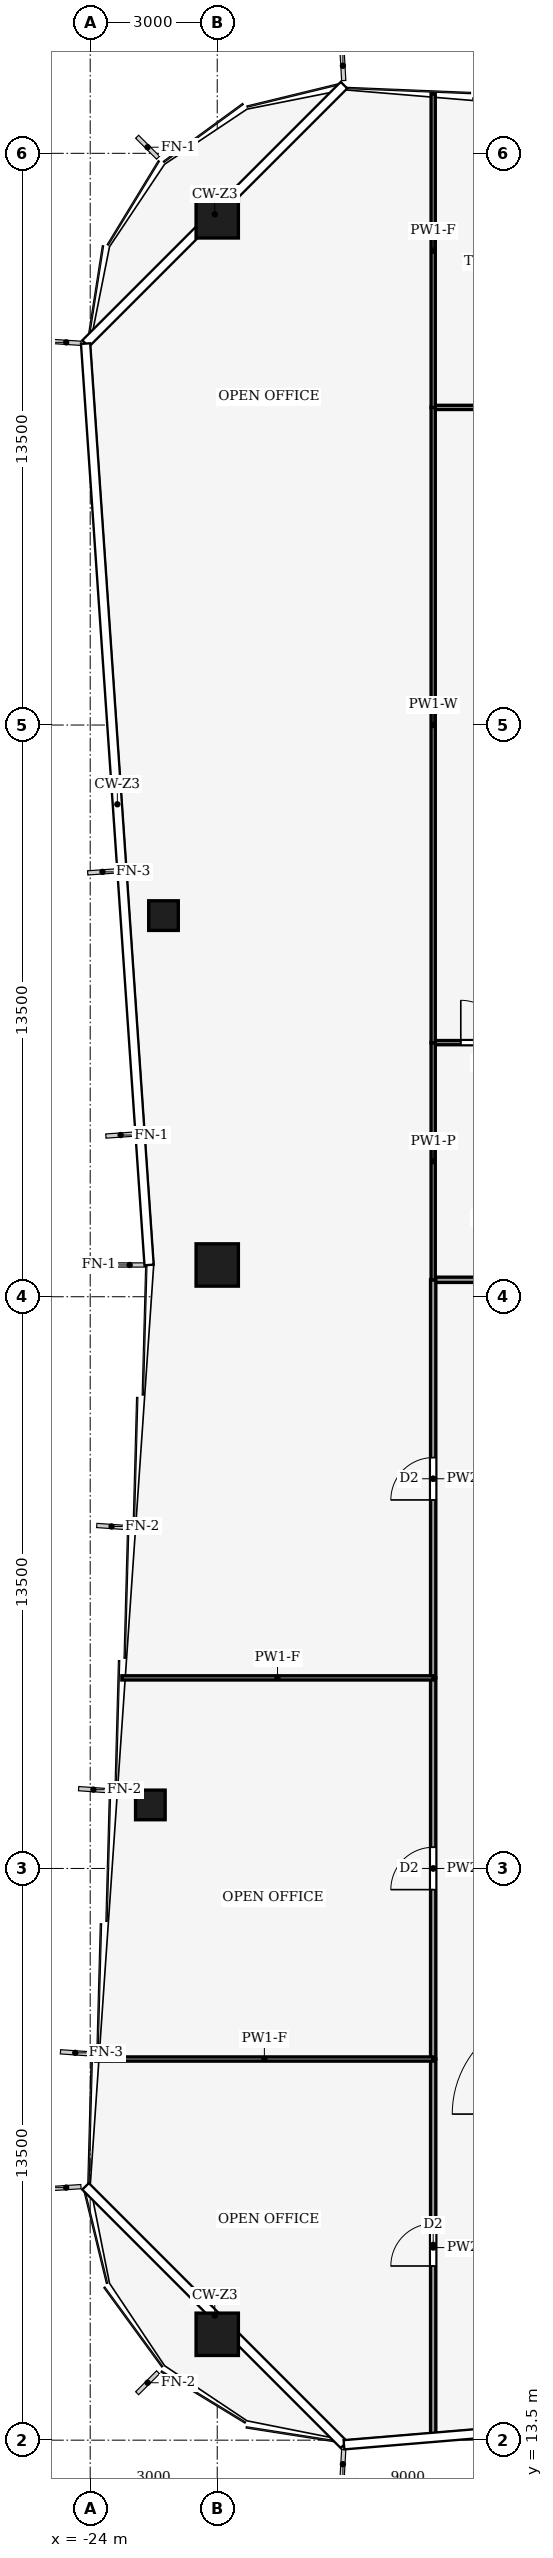
"""IFC4 building model, lengths in metres.
Left out: names, types, materials, properties, quantities, classifications, styles, units other than length and angle.
Written with IfcOpenShell. Run it as: python <this file> out.ifc"""

import sys

from ifc_helpers import new_model, si_unit, direction, frame, frame_2d, origin, origin_2d, place, context, subcontext, project, spatial, rectangle, hollow_rectangle, extrude, element, fill, save


model = new_model("IFC4")
c1 = context("Model", 3, precision=1e-05, world=origin(), true_north=direction((0.0, 1.0)))
c2 = subcontext(c1, "Body", "Model", "MODEL_VIEW")
j1 = project(units=[si_unit("LENGTHUNIT", "METRE"), si_unit("PLANEANGLEUNIT", "RADIAN")], contexts=[c1])
p1 = place(None, origin())
s1 = spatial("IfcSite", under=j1, at=p1, CompositionType="ELEMENT")
p2 = place(p1, origin())
s2 = spatial("IfcBuilding", under=s1, at=p2, CompositionType="ELEMENT")
p3 = place(p2, frame((0.0, 0.0, 206.0)))
s3 = spatial("IfcBuildingStorey", under=s2, at=p3, CompositionType="ELEMENT", Elevation=206.0)
for number, where, z_axis, x_axis in (
    (1, (-21.0, 66.0, 0.0), (0.0, 0.0, 1.0), (1.0, 0.0, 0.0)),
    (2, (-21.0, 16.0, 0.0), (0.0, 0.0, 1.0), (1.0, 0.0, 0.0)),
    (3, (-21.0, 41.25, 0.0), (0.0, 0.0, 1.0), (1.0, 0.0, 0.0)),
):
    element("IfcColumn", number, at=place(p3, frame(where, z_axis=z_axis, x_axis=x_axis)), inside=s3, PredefinedType="COLUMN", context=c2, shape_type="SweptSolid", body=[
        extrude(hollow_rectangle(XDim=1.0, YDim=1.0, WallThickness=0.06, at=origin_2d()), origin(), (0.0, 0.0, 1.0), 4.0),
    ])
for number, where, z_axis, x_axis in (
    (4, (-22.579, 28.5, 0.0), (0.0, 0.0, 1.0), (1.0, 0.0, 0.0)),
    (5, (-22.269, 49.5, 0.0), (0.0, 0.0, 1.0), (1.0, 0.0, 0.0)),
):
    element("IfcColumn", number, at=place(p3, frame(where, z_axis=z_axis, x_axis=x_axis)), inside=s3, PredefinedType="COLUMN", context=c2, shape_type="SweptSolid", body=[
        extrude(hollow_rectangle(XDim=0.7, YDim=0.7, WallThickness=0.03, at=origin_2d()), origin(), (0.0, 0.0, 1.0), 4.0),
    ])
p4 = place(p3, frame((-15.9, 40.9, 0.0), z_axis=(0.0, 0.0, 1.0), x_axis=(1.0, 0.0, 0.0)))
e6 = element("IfcWall", 6, at=p4, inside=s3, PredefinedType="PARTITIONING", context=c2, shape_type="SweptSolid", body=[
    extrude(rectangle(XDim=3.9, YDim=0.125, at=frame_2d((1.95, 0.0))), origin(), (0.0, 0.0, 1.0), 3.44),
])
p5 = place(p4, frame((1.45, 0.0, 0.0)))
e7 = element("IfcOpeningElement", 7, at=p5, cuts=e6, PredefinedType="OPENING", context=c2, shape_type="SweptSolid", body=[
    extrude(rectangle(XDim=1.0, YDim=2.1, at=frame_2d((0.5, 1.05))), frame((0.0, 0.073, 0.0), z_axis=(0.0, -1.0, 0.0), x_axis=(1.0, 0.0, 0.0)), (0.0, 0.0, 1.0), 0.145),
])
p6 = place(p3, frame((-15.9, 13.595, 0.0), z_axis=(0.0, 0.0, 1.0), x_axis=(0.0, 1.0, 0.0)))
e8 = element("IfcWall", 8, at=p6, inside=s3, PredefinedType="PARTITIONING", context=c2, shape_type="SweptSolid", body=[
    extrude(rectangle(XDim=8.905, YDim=0.125, at=frame_2d((4.453, 0.0))), origin(), (0.0, 0.0, 1.0), 3.04),
])
p7 = place(p6, frame((4.018, 0.0, 0.0)))
e9 = element("IfcOpeningElement", 9, at=p7, cuts=e8, PredefinedType="OPENING", context=c2, shape_type="SweptSolid", body=[
    extrude(rectangle(XDim=1.0, YDim=2.1, at=frame_2d((0.5, 1.05))), frame((0.0, 0.073, 0.0), z_axis=(0.0, -1.0, 0.0), x_axis=(1.0, 0.0, 0.0)), (0.0, 0.0, 1.0), 0.145),
])
p8 = place(p3, frame((-15.9, 22.5, 0.0), z_axis=(0.0, 0.0, 1.0), x_axis=(0.0, 1.0, 0.0)))
e10 = element("IfcWall", 10, at=p8, inside=s3, PredefinedType="PARTITIONING", context=c2, shape_type="SweptSolid", body=[
    extrude(rectangle(XDim=9.0, YDim=0.125, at=frame_2d((4.5, 0.0))), origin(), (0.0, 0.0, 1.0), 3.44),
])
p9 = place(p8, frame((4.0, 0.0, 0.0)))
e11 = element("IfcOpeningElement", 11, at=p9, cuts=e10, PredefinedType="OPENING", context=c2, shape_type="SweptSolid", body=[
    extrude(rectangle(XDim=1.0, YDim=2.1, at=frame_2d((0.5, 1.05))), frame((0.0, 0.073, 0.0), z_axis=(0.0, -1.0, 0.0), x_axis=(1.0, 0.0, 0.0)), (0.0, 0.0, 1.0), 0.145),
])
p10 = place(p3, frame((-15.9, 31.5, 0.0), z_axis=(0.0, 0.0, 1.0), x_axis=(0.0, 1.0, 0.0)))
e12 = element("IfcWall", 12, at=p10, inside=s3, PredefinedType="PARTITIONING", context=c2, shape_type="SweptSolid", body=[
    extrude(rectangle(XDim=9.404, YDim=0.125, at=frame_2d((4.702, 0.0))), origin(), (0.0, 0.0, 1.0), 3.14),
])
p11 = place(p10, frame((4.202, 0.0, 0.0)))
e13 = element("IfcOpeningElement", 13, at=p11, cuts=e12, PredefinedType="OPENING", context=c2, shape_type="SweptSolid", body=[
    extrude(rectangle(XDim=1.0, YDim=2.1, at=frame_2d((0.5, 1.05))), frame((0.0, 0.073, 0.0), z_axis=(0.0, -1.0, 0.0), x_axis=(1.0, 0.0, 0.0)), (0.0, 0.0, 1.0), 0.145),
])
p12 = place(p3, frame((-15.9, 46.5, 0.0), z_axis=(0.0, 0.0, 1.0), x_axis=(1.0, 0.0, 0.0)))
e14 = element("IfcWall", 14, at=p12, inside=s3, PredefinedType="PARTITIONING", context=c2, shape_type="SweptSolid", body=[
    extrude(rectangle(XDim=3.904, YDim=0.1, at=frame_2d((1.952, 0.0))), origin(), (0.0, 0.0, 1.0), 3.87),
])
p13 = place(p12, frame((0.652, 0.0, 0.0)))
e15 = element("IfcOpeningElement", 15, at=p13, cuts=e14, PredefinedType="OPENING", context=c2, shape_type="SweptSolid", body=[
    extrude(rectangle(XDim=1.0, YDim=2.1, at=frame_2d((0.5, 1.05))), frame((0.0, 0.06, 0.0), z_axis=(0.0, -1.0, 0.0), x_axis=(1.0, 0.0, 0.0)), (0.0, 0.0, 1.0), 0.12),
])
p14 = place(p3, frame((-15.9, 46.504, 0.0), z_axis=(0.0, 0.0, 1.0), x_axis=(0.0, -1.0, 0.0)))
e16 = element("IfcWall", 16, at=p14, inside=s3, PredefinedType="PARTITIONING", context=c2, shape_type="SweptSolid", body=[
    extrude(rectangle(XDim=5.608, YDim=0.1, at=frame_2d((2.804, 0.0))), origin(), (0.0, 0.0, 1.0), 3.44),
])
p15 = place(p3, frame((-15.9, 61.5, 0.0), z_axis=(0.0, 0.0, 1.0), x_axis=(1.0, 0.0, 0.0)))
e17 = element("IfcWall", 17, at=p15, inside=s3, PredefinedType="PARTITIONING", context=c2, shape_type="SweptSolid", body=[
    extrude(rectangle(XDim=12.9, YDim=0.1, at=frame_2d((6.45, 0.0))), origin(), (0.0, 0.0, 1.0), 3.24),
])
p16 = place(p15, frame((5.95, 0.0, 0.0)))
e18 = element("IfcOpeningElement", 18, at=p16, cuts=e17, PredefinedType="OPENING", context=c2, shape_type="SweptSolid", body=[
    extrude(rectangle(XDim=1.0, YDim=2.1, at=frame_2d((0.5, 1.05))), frame((0.0, 0.06, 0.0), z_axis=(0.0, -1.0, 0.0), x_axis=(1.0, 0.0, 0.0)), (0.0, 0.0, 1.0), 0.12),
])
p17 = place(p3, frame((-15.9, 61.504, 0.0), z_axis=(0.0, 0.0, 1.0), x_axis=(0.0, -1.0, 0.0)))
e19 = element("IfcWall", 19, at=p17, inside=s3, PredefinedType="PARTITIONING", context=c2, shape_type="SweptSolid", body=[
    extrude(rectangle(XDim=15.008, YDim=0.1, at=frame_2d((7.504, 0.0))), origin(), (0.0, 0.0, 1.0), 3.24),
])
p18 = place(p3, frame((-15.9, 68.905, 0.0), z_axis=(0.0, 0.0, 1.0), x_axis=(0.0, -1.0, 0.0)))
e20 = element("IfcWall", 20, at=p18, inside=s3, PredefinedType="PARTITIONING", context=c2, shape_type="SweptSolid", body=[
    extrude(rectangle(XDim=7.409, YDim=0.1, at=frame_2d((3.705, 0.0))), origin(), (0.0, 0.0, 1.0), 3.04),
])
p19 = place(p3, frame((-15.9, 22.5, 0.0), z_axis=(0.0, 0.0, 1.0), x_axis=(-1.0, 0.0, 0.0)))
e21 = element("IfcWall", 21, at=p19, inside=s3, PredefinedType="PARTITIONING", context=c2, shape_type="SweptSolid", body=[
    extrude(rectangle(XDim=7.973, YDim=0.1, at=frame_2d((3.987, 0.0))), origin(), (0.0, 0.0, 1.0), 3.04),
])
p20 = place(p3, frame((-15.9, 31.5, 0.0), z_axis=(0.0, 0.0, 1.0), x_axis=(-1.0, 0.0, 0.0)))
e22 = element("IfcWall", 22, at=p20, inside=s3, PredefinedType="PARTITIONING", context=c2, shape_type="SweptSolid", body=[
    extrude(rectangle(XDim=7.353, YDim=0.1, at=frame_2d((3.676, 0.0))), origin(), (0.0, 0.0, 1.0), 3.04),
])
p21 = place(p7, origin())
e23 = element("IfcDoor", 23, at=p21, inside=s3, OperationType="SINGLE_SWING_RIGHT", PredefinedType="DOOR", context=c2, shape_type="SweptSolid", body=[
    extrude(rectangle(XDim=1.0, YDim=2.1, at=frame_2d((0.5, 1.05))), frame((0.0, 0.025, 0.0), z_axis=(0.0, -1.0, 0.0), x_axis=(1.0, 0.0, 0.0)), (0.0, 0.0, 1.0), 0.05),
])
fill(e9, e23)
p22 = place(p9, origin())
e24 = element("IfcDoor", 24, at=p22, inside=s3, OperationType="SINGLE_SWING_RIGHT", PredefinedType="DOOR", context=c2, shape_type="SweptSolid", body=[
    extrude(rectangle(XDim=1.0, YDim=2.1, at=frame_2d((0.5, 1.05))), frame((0.0, 0.025, 0.0), z_axis=(0.0, -1.0, 0.0), x_axis=(1.0, 0.0, 0.0)), (0.0, 0.0, 1.0), 0.05),
])
fill(e11, e24)
p23 = place(p11, origin())
e25 = element("IfcDoor", 25, at=p23, inside=s3, OperationType="SINGLE_SWING_LEFT", PredefinedType="DOOR", context=c2, shape_type="SweptSolid", body=[
    extrude(rectangle(XDim=1.0, YDim=2.1, at=frame_2d((0.5, 1.05))), frame((0.0, 0.025, 0.0), z_axis=(0.0, -1.0, 0.0), x_axis=(1.0, 0.0, 0.0)), (0.0, 0.0, 1.0), 0.05),
])
fill(e13, e25)
p24 = place(p13, origin())
e26 = element("IfcDoor", 26, at=p24, inside=s3, OperationType="SINGLE_SWING_LEFT", PredefinedType="DOOR", context=c2, shape_type="SweptSolid", body=[
    extrude(rectangle(XDim=1.0, YDim=2.1, at=frame_2d((0.5, 1.05))), frame((0.0, 0.025, 0.0), z_axis=(0.0, -1.0, 0.0), x_axis=(1.0, 0.0, 0.0)), (0.0, 0.0, 1.0), 0.05),
])
fill(e15, e26)
save(model, sys.argv[1])
